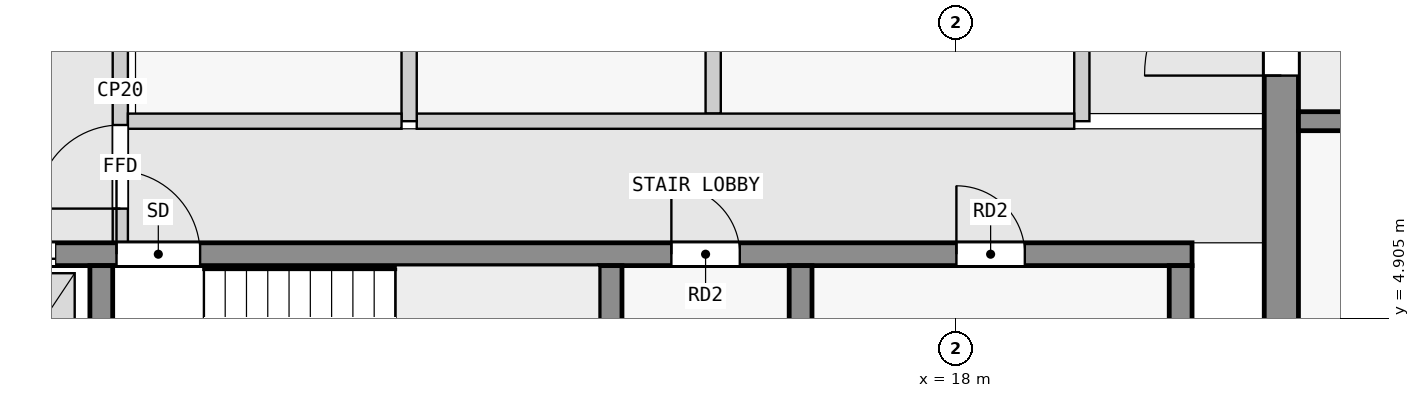
"""IFC4 building model, lengths in metres.
Left out: names, types, materials, properties, quantities, classifications, styles, units other than length and angle.
Written with IfcOpenShell. Run it as: python <this file> out.ifc"""

import sys

from ifc_helpers import new_model, si_unit, direction, frame, frame_2d, origin, place, context, subcontext, project, spatial, rectangle, extrude, element, fill, save


model = new_model("IFC4")
c1 = context("Model", 3, precision=1e-05, world=origin(), true_north=direction((0.0, 1.0)))
c2 = subcontext(c1, "Body", "Model", "MODEL_VIEW")
j1 = project(units=[si_unit("LENGTHUNIT", "METRE"), si_unit("PLANEANGLEUNIT", "RADIAN")], contexts=[c1])
p1 = place(None, origin())
s1 = spatial("IfcSite", under=j1, at=p1, CompositionType="ELEMENT")
p2 = place(p1, origin())
s2 = spatial("IfcBuilding", under=s1, at=p2, CompositionType="ELEMENT")
p3 = place(p2, frame((0.0, 0.0, 263.4)))
s3 = spatial("IfcBuildingStorey", under=s2, at=p3, CompositionType="ELEMENT", Elevation=263.4)
p4 = place(p3, frame((22.275, 2.5, 0.0), z_axis=(0.0, 0.0, 1.0), x_axis=(0.0, 1.0, 0.0)))
e1 = element("IfcWall", 1, at=p4, inside=s3, PredefinedType="SHEAR", context=c2, shape_type="SweptSolid", body=[
    extrude(rectangle(XDim=15.05, YDim=0.45, at=frame_2d((7.525, 0.0))), origin(), (0.0, 0.0, 1.0), 3.25),
])
p5 = place(p4, frame((5.6, 0.0, 0.0)))
e2 = element("IfcOpeningElement", 2, at=p5, cuts=e1, PredefinedType="OPENING", context=c2, shape_type="SweptSolid", body=[
    extrude(rectangle(XDim=1.8, YDim=2.1, at=frame_2d((0.9, 1.05))), frame((0.0, 0.235, 0.0), z_axis=(0.0, -1.0, 0.0), x_axis=(1.0, 0.0, 0.0)), (0.0, 0.0, 1.0), 0.47),
])
for number, where, z_axis, x_axis in (
    (3, (6.75, 2.8, 0.0), (0.0, 0.0, 1.0), (0.0, 1.0, 0.0)),
    (4, (13.45, 2.8, 0.0), (0.0, 0.0, 1.0), (0.0, 1.0, 0.0)),
    (5, (15.95, 2.8, 0.0), (0.0, 0.0, 1.0), (0.0, 1.0, 0.0)),
    (6, (20.95, 2.8, 0.0), (0.0, 0.0, 1.0), (0.0, 1.0, 0.0)),
):
    element("IfcWall", number, at=place(p3, frame(where, z_axis=z_axis, x_axis=x_axis)), inside=s3, PredefinedType="SHEAR", context=c2, shape_type="SweptSolid", body=[
        extrude(rectangle(XDim=2.8, YDim=0.3, at=frame_2d((1.4, 0.0))), origin(), (0.0, 0.0, 1.0), 3.25),
    ])
p6 = place(p3, frame((2.3, 5.75, 0.0), z_axis=(0.0, 0.0, 1.0), x_axis=(1.0, 0.0, 0.0)))
e7 = element("IfcWall", 7, at=p6, inside=s3, PredefinedType="SHEAR", context=c2, shape_type="SweptSolid", body=[
    extrude(rectangle(XDim=18.8, YDim=0.3, at=frame_2d((9.4, 0.0))), origin(), (0.0, 0.0, 1.0), 3.25),
])
p7 = place(p6, frame((4.65, 0.0, 0.0)))
e8 = element("IfcOpeningElement", 8, at=p7, cuts=e7, PredefinedType="OPENING", context=c2, shape_type="SweptSolid", body=[
    extrude(rectangle(XDim=1.1, YDim=2.1, at=frame_2d((0.55, 1.05))), frame((0.0, 0.16, 0.0), z_axis=(0.0, -1.0, 0.0), x_axis=(1.0, 0.0, 0.0)), (0.0, 0.0, 1.0), 0.32),
])
p8 = place(p6, frame((0.45, 0.0, 0.0)))
e9 = element("IfcOpeningElement", 9, at=p8, cuts=e7, PredefinedType="OPENING", context=c2, shape_type="SweptSolid", body=[
    extrude(rectangle(XDim=1.1, YDim=2.1, at=frame_2d((0.55, 1.05))), frame((0.0, 0.16, 0.0), z_axis=(0.0, -1.0, 0.0), x_axis=(1.0, 0.0, 0.0)), (0.0, 0.0, 1.0), 0.32),
])
p9 = place(p6, frame((2.75, 0.0, 0.0)))
e10 = element("IfcOpeningElement", 10, at=p9, cuts=e7, PredefinedType="OPENING", context=c2, shape_type="SweptSolid", body=[
    extrude(rectangle(XDim=1.1, YDim=2.1, at=frame_2d((0.55, 1.05))), frame((0.0, 0.16, 0.0), z_axis=(0.0, -1.0, 0.0), x_axis=(1.0, 0.0, 0.0)), (0.0, 0.0, 1.0), 0.32),
])
p10 = place(p6, frame((11.95, 0.0, 0.0)))
e11 = element("IfcOpeningElement", 11, at=p10, cuts=e7, PredefinedType="OPENING", context=c2, shape_type="SweptSolid", body=[
    extrude(rectangle(XDim=0.9, YDim=2.1, at=frame_2d((0.45, 1.05))), frame((0.0, 0.16, 0.0), z_axis=(0.0, -1.0, 0.0), x_axis=(1.0, 0.0, 0.0)), (0.0, 0.0, 1.0), 0.32),
])
p11 = place(p6, frame((15.7, 0.0, 0.0)))
e12 = element("IfcOpeningElement", 12, at=p11, cuts=e7, PredefinedType="OPENING", context=c2, shape_type="SweptSolid", body=[
    extrude(rectangle(XDim=0.9, YDim=2.1, at=frame_2d((0.45, 1.05))), frame((0.0, 0.16, 0.0), z_axis=(0.0, -1.0, 0.0), x_axis=(1.0, 0.0, 0.0)), (0.0, 0.0, 1.0), 0.32),
])
p12 = place(p3, frame((22.5, 7.5, 0.0), z_axis=(0.0, 0.0, 1.0), x_axis=(1.0, 0.0, 0.0)))
e13 = element("IfcWall", 13, at=p12, inside=s3, PredefinedType="SHEAR", context=c2, shape_type="SweptSolid", body=[
    extrude(rectangle(XDim=22.5, YDim=0.25, at=frame_2d((11.25, 0.0))), origin(), (0.0, 0.0, 1.0), 3.25),
])
p13 = place(p12, frame((1.75, 0.0, 0.0)))
e14 = element("IfcOpeningElement", 14, at=p13, cuts=e13, PredefinedType="OPENING", context=c2, shape_type="SweptSolid", body=[
    extrude(rectangle(XDim=1.0, YDim=2.1, at=frame_2d((0.5, 1.05))), frame((0.0, 0.135, 0.0), z_axis=(0.0, -1.0, 0.0), x_axis=(1.0, 0.0, 0.0)), (0.0, 0.0, 1.0), 0.27),
])
p14 = place(p12, frame((6.25, 0.0, 0.0)))
e15 = element("IfcOpeningElement", 15, at=p14, cuts=e13, PredefinedType="OPENING", context=c2, shape_type="SweptSolid", body=[
    extrude(rectangle(XDim=1.0, YDim=2.1, at=frame_2d((0.5, 1.05))), frame((0.0, 0.135, 0.0), z_axis=(0.0, -1.0, 0.0), x_axis=(1.0, 0.0, 0.0)), (0.0, 0.0, 1.0), 0.27),
])
p15 = place(p12, frame((10.35, 0.0, 0.0)))
e16 = element("IfcOpeningElement", 16, at=p15, cuts=e13, PredefinedType="OPENING", context=c2, shape_type="SweptSolid", body=[
    extrude(rectangle(XDim=1.8, YDim=2.1, at=frame_2d((0.9, 1.05))), frame((0.0, 0.135, 0.0), z_axis=(0.0, -1.0, 0.0), x_axis=(1.0, 0.0, 0.0)), (0.0, 0.0, 1.0), 0.27),
])
p16 = place(p12, frame((15.25, 0.0, 0.0)))
e17 = element("IfcOpeningElement", 17, at=p16, cuts=e13, PredefinedType="OPENING", context=c2, shape_type="SweptSolid", body=[
    extrude(rectangle(XDim=1.0, YDim=2.1, at=frame_2d((0.5, 1.05))), frame((0.0, 0.135, 0.0), z_axis=(0.0, -1.0, 0.0), x_axis=(1.0, 0.0, 0.0)), (0.0, 0.0, 1.0), 0.27),
])
p17 = place(p12, frame((18.75, 0.0, 0.0)))
e18 = element("IfcOpeningElement", 18, at=p17, cuts=e13, PredefinedType="OPENING", context=c2, shape_type="SweptSolid", body=[
    extrude(rectangle(XDim=0.9, YDim=2.1, at=frame_2d((0.45, 1.05))), frame((0.0, 0.135, 0.0), z_axis=(0.0, -1.0, 0.0), x_axis=(1.0, 0.0, 0.0)), (0.0, 0.0, 1.0), 0.27),
])
p18 = place(p12, frame((20.95, 0.0, 0.0)))
e19 = element("IfcOpeningElement", 19, at=p18, cuts=e13, PredefinedType="OPENING", context=c2, shape_type="SweptSolid", body=[
    extrude(rectangle(XDim=1.0, YDim=2.1, at=frame_2d((0.5, 1.05))), frame((0.0, 0.135, 0.0), z_axis=(0.0, -1.0, 0.0), x_axis=(1.0, 0.0, 0.0)), (0.0, 0.0, 1.0), 0.27),
])
p19 = place(p3, frame((7.0, 5.9, 0.0), z_axis=(0.0, 0.0, 1.0), x_axis=(0.0, 1.0, 0.0)))
e20 = element("IfcWall", 20, at=p19, inside=s3, PredefinedType="PARTITIONING", context=c2, shape_type="SweptSolid", body=[
    extrude(rectangle(XDim=4.0, YDim=0.2, at=frame_2d((2.0, 0.0))), origin(), (0.0, 0.0, 1.0), 3.25),
])
p20 = place(p19, frame((0.45, 0.0, 0.0)))
e21 = element("IfcOpeningElement", 21, at=p20, cuts=e20, PredefinedType="OPENING", context=c2, shape_type="SweptSolid", body=[
    extrude(rectangle(XDim=1.1, YDim=2.1, at=frame_2d((0.55, 1.05))), frame((0.0, 0.11, 0.0), z_axis=(0.0, -1.0, 0.0), x_axis=(1.0, 0.0, 0.0)), (0.0, 0.0, 1.0), 0.22),
])
p21 = place(p3, frame((7.1, 7.5, 0.0), z_axis=(0.0, 0.0, 1.0), x_axis=(1.0, 0.0, 0.0)))
e22 = element("IfcWall", 22, at=p21, inside=s3, PredefinedType="PARTITIONING", context=c2, shape_type="SweptSolid", body=[
    extrude(rectangle(XDim=3.6, YDim=0.2, at=frame_2d((1.8, 0.0))), origin(), (0.0, 0.0, 1.0), 3.25),
])
p22 = place(p3, frame((10.8, 7.5, 0.0), z_axis=(0.0, 0.0, 1.0), x_axis=(0.0, 1.0, 0.0)))
e23 = element("IfcWall", 23, at=p22, inside=s3, PredefinedType="PARTITIONING", context=c2, shape_type="SweptSolid", body=[
    extrude(rectangle(XDim=4.7, YDim=0.2, at=frame_2d((2.35, 0.0))), origin(), (0.0, 0.0, 1.0), 3.25),
])
p23 = place(p3, frame((10.9, 7.5, 0.0), z_axis=(0.0, 0.0, 1.0), x_axis=(1.0, 0.0, 0.0)))
e24 = element("IfcWall", 24, at=p23, inside=s3, PredefinedType="PARTITIONING", context=c2, shape_type="SweptSolid", body=[
    extrude(rectangle(XDim=8.65, YDim=0.2, at=frame_2d((4.325, 0.0))), origin(), (0.0, 0.0, 1.0), 3.25),
])
p24 = place(p3, frame((19.65, 7.5, 0.0), z_axis=(0.0, 0.0, 1.0), x_axis=(0.0, 1.0, 0.0)))
e25 = element("IfcWall", 25, at=p24, inside=s3, PredefinedType="PARTITIONING", context=c2, shape_type="SweptSolid", body=[
    extrude(rectangle(XDim=4.7, YDim=0.2, at=frame_2d((2.35, 0.0))), origin(), (0.0, 0.0, 1.0), 3.25),
])
p25 = place(p3, frame((14.8, 7.6, 0.0), z_axis=(0.0, 0.0, 1.0), x_axis=(0.0, 1.0, 0.0)))
e26 = element("IfcWall", 26, at=p25, inside=s3, PredefinedType="PARTITIONING", context=c2, shape_type="SweptSolid", body=[
    extrude(rectangle(XDim=4.5, YDim=0.2, at=frame_2d((2.25, 0.0))), origin(), (0.0, 0.0, 1.0), 3.25),
])
p26 = place(p20, origin())
e27 = element("IfcDoor", 27, at=p26, inside=s3, OperationType="SINGLE_SWING_LEFT", PredefinedType="DOOR", context=c2, shape_type="SweptSolid", body=[
    extrude(rectangle(XDim=1.1, YDim=2.1, at=frame_2d((0.55, 1.05))), frame((0.0, 0.025, 0.0), z_axis=(0.0, -1.0, 0.0), x_axis=(1.0, 0.0, 0.0)), (0.0, 0.0, 1.0), 0.05),
])
fill(e21, e27)
p27 = place(p7, origin())
e28 = element("IfcDoor", 28, at=p27, inside=s3, OperationType="SINGLE_SWING_LEFT", PredefinedType="DOOR", context=c2, shape_type="SweptSolid", body=[
    extrude(rectangle(XDim=1.1, YDim=2.1, at=frame_2d((0.55, 1.05))), frame((0.0, 0.025, 0.0), z_axis=(0.0, -1.0, 0.0), x_axis=(1.0, 0.0, 0.0)), (0.0, 0.0, 1.0), 0.05),
])
fill(e8, e28)
p28 = place(p9, origin())
e29 = element("IfcDoor", 29, at=p28, inside=s3, OperationType="DOUBLE_DOOR_SLIDING", PredefinedType="DOOR", context=c2, shape_type="SweptSolid", body=[
    extrude(rectangle(XDim=1.1, YDim=2.1, at=frame_2d((0.55, 1.05))), frame((0.0, 0.025, 0.0), z_axis=(0.0, -1.0, 0.0), x_axis=(1.0, 0.0, 0.0)), (0.0, 0.0, 1.0), 0.05),
])
fill(e10, e29)
p29 = place(p5, origin())
e30 = element("IfcDoor", 30, at=p29, inside=s3, OperationType="DOUBLE_DOOR_SINGLE_SWING", PredefinedType="DOOR", context=c2, shape_type="SweptSolid", body=[
    extrude(rectangle(XDim=1.8, YDim=2.1, at=frame_2d((0.9, 1.05))), frame((0.0, 0.025, 0.0), z_axis=(0.0, -1.0, 0.0), x_axis=(1.0, 0.0, 0.0)), (0.0, 0.0, 1.0), 0.05),
])
fill(e2, e30)
p30 = place(p10, origin())
e31 = element("IfcDoor", 31, at=p30, inside=s3, OperationType="SINGLE_SWING_LEFT", PredefinedType="DOOR", context=c2, shape_type="SweptSolid", body=[
    extrude(rectangle(XDim=0.9, YDim=2.1, at=frame_2d((0.45, 1.05))), frame((0.0, 0.025, 0.0), z_axis=(0.0, -1.0, 0.0), x_axis=(1.0, 0.0, 0.0)), (0.0, 0.0, 1.0), 0.05),
])
fill(e11, e31)
p31 = place(p11, origin())
e32 = element("IfcDoor", 32, at=p31, inside=s3, OperationType="SINGLE_SWING_LEFT", PredefinedType="DOOR", context=c2, shape_type="SweptSolid", body=[
    extrude(rectangle(XDim=0.9, YDim=2.1, at=frame_2d((0.45, 1.05))), frame((0.0, 0.025, 0.0), z_axis=(0.0, -1.0, 0.0), x_axis=(1.0, 0.0, 0.0)), (0.0, 0.0, 1.0), 0.05),
])
fill(e12, e32)
save(model, sys.argv[1])
